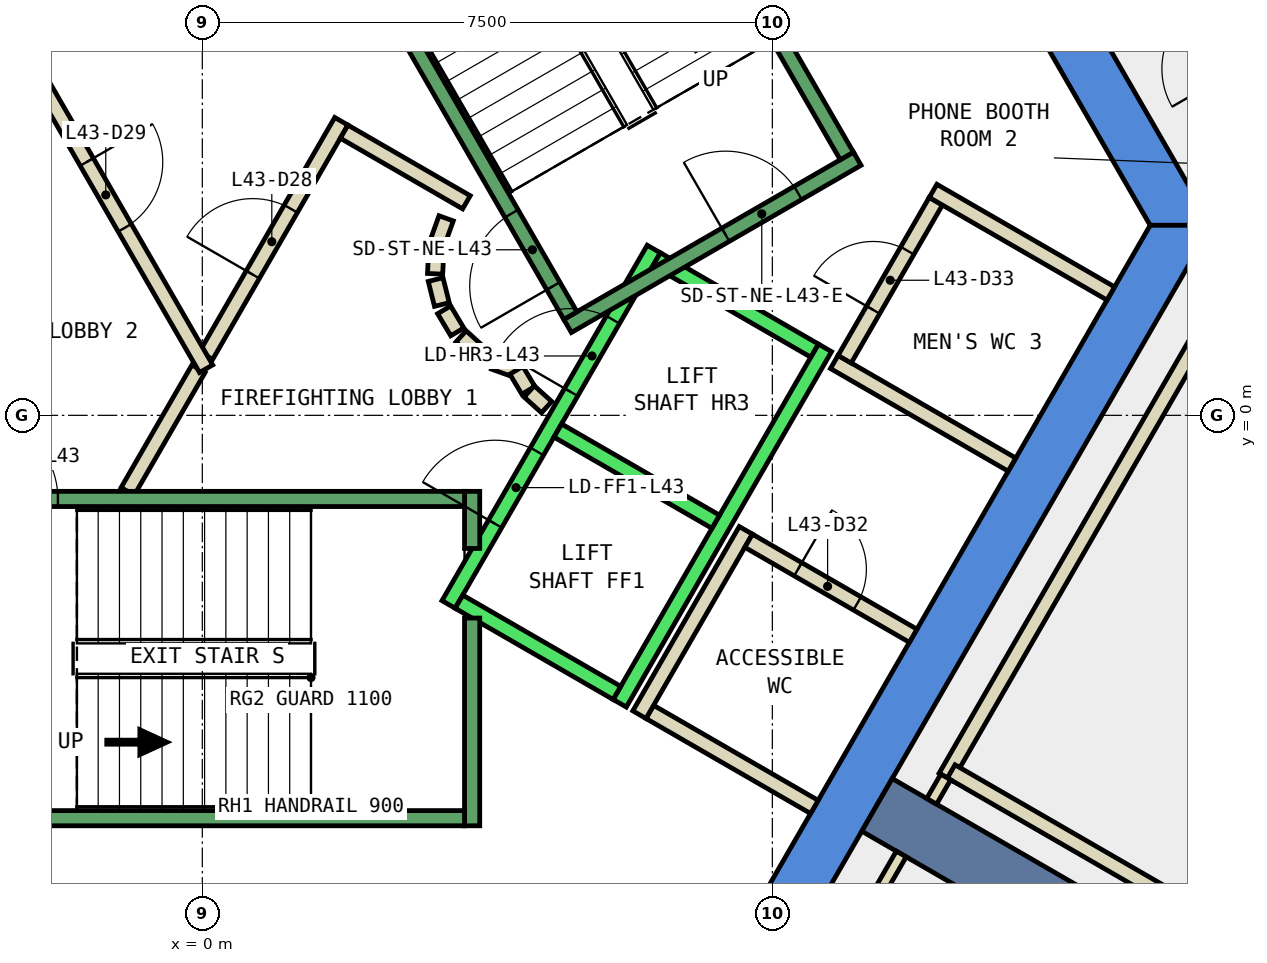
"""IFC4 building model, lengths in metres.
Left out: names, types, materials, properties, quantities, classifications, styles, units other than length and angle.
Written with IfcOpenShell. Run it as: python <this file> out.ifc"""

import sys

from ifc_helpers import new_model, si_unit, direction, frame, frame_2d, origin, place, context, subcontext, project, spatial, polyline, rectangle, outline, extrude, element, fill, save


model = new_model("IFC4")
c1 = context("Model", 3, precision=1e-05, world=origin(), true_north=direction((0.0, 1.0)))
c2 = subcontext(c1, "Body", "Model", "MODEL_VIEW")
j1 = project(units=[si_unit("LENGTHUNIT", "METRE"), si_unit("PLANEANGLEUNIT", "RADIAN")], contexts=[c1])
p1 = place(None, origin())
s1 = spatial("IfcSite", under=j1, at=p1, CompositionType="ELEMENT")
p2 = place(p1, origin())
s2 = spatial("IfcBuilding", under=s1, at=p2, CompositionType="ELEMENT")
p3 = place(p2, frame((0.0, 0.0, 194.0)))
s3 = spatial("IfcBuildingStorey", under=s2, at=p3, CompositionType="ELEMENT", Elevation=194.0)
p4 = place(p3, frame((0.0, 0.0, -0.4)))
e1 = element("IfcWall", 1, at=p4, inside=s3, PredefinedType="SHEAR", context=c2, shape_type="SweptSolid", body=[
    extrude(outline(polyline([(8.084, 11.498), (7.478, 11.148), (12.471, 2.5), (13.279, 2.5), (8.084, 11.498)])), origin(), (0.0, 0.0, 1.0), 4.2),
])
p5 = place(p3, frame((0.0, 0.0, -0.4)))
e2 = element("IfcWall", 2, at=p5, inside=s3, PredefinedType="SHEAR", context=c2, shape_type="SweptSolid", body=[
    extrude(outline(polyline([(6.64, -9.0), (13.279, 2.5), (12.471, 2.5), (6.235, -8.3), (6.64, -9.0)])), origin(), (0.0, 0.0, 1.0), 4.2),
])
p6 = place(p3, frame((8.877, -5.125, -0.4), z_axis=(0.0, 0.0, 1.0), x_axis=(0.866017533419, -0.500013631625, 0.0)))
e3 = element("IfcWall", 3, at=p6, inside=s3, PredefinedType="SHEAR", context=c2, shape_type="SweptSolid", body=[
    extrude(rectangle(XDim=9.0, YDim=0.8, at=frame_2d((4.5, 0.0))), origin(), (0.0, 0.0, 1.0), 4.2),
])
p7 = place(p3, frame((14.213, 3.543, 0.0), z_axis=(0.0, 0.0, 1.0), x_axis=(-0.500182898346, 0.865919781621, 0.0)))
e4 = element("IfcWall", 4, at=p7, inside=s3, PredefinedType="PARTITIONING", context=c2, shape_type="SweptSolid", body=[
    extrude(rectangle(XDim=3.35, YDim=0.2, at=frame_2d((1.675, 0.0))), origin(), (0.0, 0.0, 1.0), 3.8),
])
p8 = place(p7, frame((1.175, 0.0, 0.0)))
e5 = element("IfcOpeningElement", 5, at=p8, cuts=e4, PredefinedType="OPENING", context=c2, shape_type="SweptSolid", body=[
    extrude(rectangle(XDim=1.0, YDim=2.1, at=frame_2d((0.5, 1.05))), frame((0.0, 0.11, 0.0), z_axis=(0.0, -1.0, 0.0), x_axis=(1.0, 0.0, 0.0)), (0.0, 0.0, 1.0), 0.22),
])
p9 = place(p3, frame((11.811, 11.503, 0.0), z_axis=(0.0, 0.0, 1.0), x_axis=(0.500013420409, -0.866017655369, 0.0)))
e6 = element("IfcWall", 6, at=p9, inside=s3, PredefinedType="PARTITIONING", context=c2, shape_type="SweptSolid", body=[
    extrude(rectangle(XDim=8.038, YDim=0.2, at=frame_2d((4.019, 0.0))), origin(), (0.0, 0.0, 1.0), 3.8),
])
p10 = place(p9, frame((3.594, 0.0, 0.0)))
e7 = element("IfcOpeningElement", 7, at=p10, cuts=e6, PredefinedType="OPENING", context=c2, shape_type="SweptSolid", body=[
    extrude(rectangle(XDim=1.0, YDim=2.1, at=frame_2d((0.5, 1.05))), frame((0.0, 0.11, 0.0), z_axis=(0.0, -1.0, 0.0), x_axis=(1.0, 0.0, 0.0)), (0.0, 0.0, 1.0), 0.22),
])
p11 = place(p3, frame((8.053, -5.152, 0.0), z_axis=(0.0, 0.0, 1.0), x_axis=(-0.866022959057, 0.500004234368, 0.0)))
e8 = element("IfcWall", 8, at=p11, inside=s3, PredefinedType="PARTITIONING", context=c2, shape_type="SweptSolid", body=[
    extrude(rectangle(XDim=2.5, YDim=0.2, at=frame_2d((1.25, 0.0))), origin(), (0.0, 0.0, 1.0), 3.8),
])
p12 = place(p3, frame((5.751, -3.938, 0.0), z_axis=(0.0, 0.0, 1.0), x_axis=(0.49994636267, 0.866056369097, 0.0)))
e9 = element("IfcWall", 9, at=p12, inside=s3, PredefinedType="PARTITIONING", context=c2, shape_type="SweptSolid", body=[
    extrude(rectangle(XDim=2.8, YDim=0.2, at=frame_2d((1.4, 0.0))), origin(), (0.0, 0.0, 1.0), 3.8),
])
p13 = place(p3, frame((7.188, -1.65, 0.0), z_axis=(0.0, 0.0, 1.0), x_axis=(0.866022959057, -0.500004234368, 0.0)))
e10 = element("IfcWall", 10, at=p13, inside=s3, PredefinedType="PARTITIONING", context=c2, shape_type="SweptSolid", body=[
    extrude(rectangle(XDim=2.5, YDim=0.2, at=frame_2d((1.25, 0.0))), origin(), (0.0, 0.0, 1.0), 3.8),
])
p14 = place(p13, frame((0.75, 0.0, 0.0)))
e11 = element("IfcOpeningElement", 11, at=p14, cuts=e10, PredefinedType="OPENING", context=c2, shape_type="SweptSolid", body=[
    extrude(rectangle(XDim=0.9, YDim=2.1, at=frame_2d((0.45, 1.05))), frame((0.0, 0.11, 0.0), z_axis=(0.0, -1.0, 0.0), x_axis=(1.0, 0.0, 0.0)), (0.0, 0.0, 1.0), 0.22),
])
p15 = place(p3, frame((10.653, -0.648, 0.0), z_axis=(0.0, 0.0, 1.0), x_axis=(-0.866036505625, 0.499980770555, 0.0)))
e12 = element("IfcWall", 12, at=p15, inside=s3, PredefinedType="PARTITIONING", context=c2, shape_type="SweptSolid", body=[
    extrude(rectangle(XDim=2.7, YDim=0.2, at=frame_2d((1.35, 0.0))), origin(), (0.0, 0.0, 1.0), 3.8),
])
p16 = place(p3, frame((8.451, 0.738, 0.0), z_axis=(0.0, 0.0, 1.0), x_axis=(0.499913221443, 0.866075499611, 0.0)))
e13 = element("IfcWall", 13, at=p16, inside=s3, PredefinedType="PARTITIONING", context=c2, shape_type="SweptSolid", body=[
    extrude(rectangle(XDim=2.4, YDim=0.2, at=frame_2d((1.2, 0.0))), origin(), (0.0, 0.0, 1.0), 3.8),
])
p17 = place(p16, frame((0.75, 0.0, 0.0)))
e14 = element("IfcOpeningElement", 14, at=p17, cuts=e13, PredefinedType="OPENING", context=c2, shape_type="SweptSolid", body=[
    extrude(rectangle(XDim=0.9, YDim=2.1, at=frame_2d((0.45, 1.05))), frame((0.0, 0.11, 0.0), z_axis=(0.0, -1.0, 0.0), x_axis=(1.0, 0.0, 0.0)), (0.0, 0.0, 1.0), 0.22),
])
p18 = place(p3, frame((9.615, 2.953, 0.0), z_axis=(0.0, 0.0, 1.0), x_axis=(0.866013897511, -0.50001992892, 0.0)))
e15 = element("IfcWall", 15, at=p18, inside=s3, PredefinedType="PARTITIONING", context=c2, shape_type="SweptSolid", body=[
    extrude(rectangle(XDim=2.7, YDim=0.2, at=frame_2d((1.35, 0.0))), origin(), (0.0, 0.0, 1.0), 3.8),
])
p19 = place(p3, frame((7.283, -9.086, 0.0), z_axis=(0.0, 0.0, 1.0), x_axis=(0.499843936326, 0.866115488442, 0.0)))
e16 = element("IfcWall", 16, at=p19, inside=s3, PredefinedType="PARTITIONING", context=c2, shape_type="SweptSolid", body=[
    extrude(rectangle(XDim=3.827, YDim=0.15, at=frame_2d((1.914, 0.0))), origin(), (0.0, 0.0, 1.0), 3.8),
])
p20 = place(p3, frame((9.781, -4.758, 0.0), z_axis=(0.0, 0.0, 1.0), x_axis=(0.50003174578, 0.866007074574, 0.0)))
e17 = element("IfcWall", 17, at=p20, inside=s3, PredefinedType="PARTITIONING", context=c2, shape_type="SweptSolid", body=[
    extrude(rectangle(XDim=9.315, YDim=0.2, at=frame_2d((4.658, 0.0))), origin(), (0.0, 0.0, 1.0), 3.8),
])
p21 = place(p3, frame((-0.982, -1.0, 0.0), z_axis=(0.0, 0.0, 1.0), x_axis=(0.50024047865, 0.865886518847, 0.0)))
e18 = element("IfcWall", 18, at=p21, inside=s3, PredefinedType="PARTITIONING", context=c2, shape_type="SweptSolid", body=[
    extrude(rectangle(XDim=1.863, YDim=0.2, at=frame_2d((0.931, 0.0))), origin(), (0.0, 0.0, 1.0), 3.8),
])
p22 = place(p3, frame((0.05, 0.787, 0.0), z_axis=(0.0, 0.0, 1.0), x_axis=(0.499954076797, 0.866051915934, 0.0)))
e19 = element("IfcWall", 19, at=p22, inside=s3, PredefinedType="PARTITIONING", context=c2, shape_type="SweptSolid", body=[
    extrude(rectangle(XDim=3.558, YDim=0.2, at=frame_2d((1.779, 0.0))), origin(), (0.0, 0.0, 1.0), 3.8),
])
p23 = place(p22, frame((1.229, 0.0, 0.0)))
e20 = element("IfcOpeningElement", 20, at=p23, cuts=e19, PredefinedType="OPENING", context=c2, shape_type="SweptSolid", body=[
    extrude(rectangle(XDim=1.0, YDim=2.1, at=frame_2d((0.5, 1.05))), frame((0.0, 0.11, 0.0), z_axis=(0.0, -1.0, 0.0), x_axis=(1.0, 0.0, 0.0)), (0.0, 0.0, 1.0), 0.22),
])
p24 = place(p3, frame((1.866, 3.732, 0.0), z_axis=(0.0, 0.0, 1.0), x_axis=(0.866043361281, -0.499968895414, 0.0)))
e21 = element("IfcWall", 21, at=p24, inside=s3, PredefinedType="PARTITIONING", context=c2, shape_type="SweptSolid", body=[
    extrude(rectangle(XDim=1.858, YDim=0.2, at=frame_2d((0.929, 0.0))), origin(), (0.0, 0.0, 1.0), 3.8),
])
p25 = place(p3, frame((3.208, 2.592, 0.0), z_axis=(0.0, 0.0, 1.0), x_axis=(-0.337388820924, -0.941365382578, 0.0)))
e22 = element("IfcWall", 22, at=p25, inside=s3, PredefinedType="PARTITIONING", context=c2, shape_type="SweptSolid", body=[
    extrude(rectangle(XDim=0.338, YDim=0.2, at=frame_2d((0.169, 0.0))), origin(), (0.0, 0.0, 1.0), 3.8),
])
p26 = place(p3, frame((3.079, 2.199, 0.0), z_axis=(0.0, 0.0, 1.0), x_axis=(-0.047771483479, -0.998858290933, 0.0)))
e23 = element("IfcWall", 23, at=p26, inside=s3, PredefinedType="PARTITIONING", context=c2, shape_type="SweptSolid", body=[
    extrude(rectangle(XDim=0.337, YDim=0.2, at=frame_2d((0.169, 0.0))), origin(), (0.0, 0.0, 1.0), 3.8),
])
p27 = place(p3, frame((3.07, 1.786, 0.0), z_axis=(0.0, 0.0, 1.0), x_axis=(0.242705583207, -0.970099994784, 0.0)))
e24 = element("IfcWall", 24, at=p27, inside=s3, PredefinedType="PARTITIONING", context=c2, shape_type="SweptSolid", body=[
    extrude(rectangle(XDim=0.338, YDim=0.2, at=frame_2d((0.169, 0.0))), origin(), (0.0, 0.0, 1.0), 3.8),
])
for number, where, z_axis, x_axis in (
    (25, (3.182, 1.388, 0.0), (0.0, 0.0, 1.0), (0.512, -0.859, 0.0)),
    (26, (3.404, 1.039, 0.0), (0.0, 0.0, 1.0), (0.74, -0.672, 0.0)),
):
    element("IfcWall", number, at=place(p3, frame(where, z_axis=z_axis, x_axis=x_axis)), inside=s3, PredefinedType="PARTITIONING", context=c2, shape_type="SweptSolid", body=[
        extrude(rectangle(XDim=0.338, YDim=0.2, at=frame_2d((0.169, 0.0))), origin(), (0.0, 0.0, 1.0), 3.8),
    ])
p28 = place(p3, frame((3.838, 0.702, 0.0), z_axis=(0.0, 0.0, 1.0), x_axis=(0.941035081519, -0.338308993895, 0.0)))
e27 = element("IfcWall", 27, at=p28, inside=s3, PredefinedType="PARTITIONING", context=c2, shape_type="SweptSolid", body=[
    extrude(rectangle(XDim=0.337, YDim=0.2, at=frame_2d((0.168, 0.0))), origin(), (0.0, 0.0, 1.0), 3.8),
])
p29 = place(p3, frame((4.132, 0.593, 0.0), z_axis=(0.0, 0.0, 1.0), x_axis=(0.513561617048, -0.858052717201, 0.0)))
e28 = element("IfcWall", 28, at=p29, inside=s3, PredefinedType="PARTITIONING", context=c2, shape_type="SweptSolid", body=[
    extrude(rectangle(XDim=0.308, YDim=0.2, at=frame_2d((0.154, 0.0))), origin(), (0.0, 0.0, 1.0), 3.8),
])
p30 = place(p3, frame((4.301, 0.315, 0.0), z_axis=(0.0, 0.0, 1.0), x_axis=(0.741798017506, -0.670623367639, 0.0)))
e29 = element("IfcWall", 29, at=p30, inside=s3, PredefinedType="PARTITIONING", context=c2, shape_type="SweptSolid", body=[
    extrude(rectangle(XDim=0.309, YDim=0.2, at=frame_2d((0.154, 0.0))), origin(), (0.0, 0.0, 1.0), 3.8),
])
p31 = place(p3, frame((-2.54, 5.1, 0.0), z_axis=(0.0, 0.0, 1.0), x_axis=(0.499925051871, -0.866068670783, 0.0)))
e30 = element("IfcWall", 30, at=p31, inside=s3, PredefinedType="PARTITIONING", context=c2, shape_type="SweptSolid", body=[
    extrude(rectangle(XDim=5.181, YDim=0.2, at=frame_2d((2.59, 0.0))), origin(), (0.0, 0.0, 1.0), 3.8),
])
p32 = place(p31, frame((2.04, 0.0, 0.0)))
e31 = element("IfcOpeningElement", 31, at=p32, cuts=e30, PredefinedType="OPENING", context=c2, shape_type="SweptSolid", body=[
    extrude(rectangle(XDim=1.0, YDim=2.1, at=frame_2d((0.5, 1.05))), frame((0.0, 0.11, 0.0), z_axis=(0.0, -1.0, 0.0), x_axis=(1.0, 0.0, 0.0)), (0.0, 0.0, 1.0), 0.22),
])
p33 = place(p3, frame((9.853, -4.684, 0.0), z_axis=(0.0, 0.0, 1.0), x_axis=(0.865999791918, -0.500044358431, 0.0)))
e32 = element("IfcWall", 32, at=p33, inside=s3, PredefinedType="PARTITIONING", context=c2, shape_type="SweptSolid", body=[
    extrude(rectangle(XDim=8.075, YDim=0.2, at=frame_2d((4.038, 0.0))), origin(), (0.0, 0.0, 1.0), 3.8),
])
p34 = place(p3, frame((9.596, -5.078, 0.0), z_axis=(0.0, 0.0, 1.0), x_axis=(0.500827895298, 0.86554689029, 0.0)))
e33 = element("IfcWall", 33, at=p34, inside=s3, PredefinedType="PARTITIONING", context=c2, shape_type="SweptSolid", body=[
    extrude(rectangle(XDim=0.369, YDim=0.15, at=frame_2d((0.185, 0.0))), origin(), (0.0, 0.0, 1.0), 3.8),
])
p35 = place(p3, frame((3.24, -2.488, 0.0), z_axis=(0.0, 0.0, 1.0), x_axis=(0.500034260056, 0.866005622828, 0.0)))
e34 = element("IfcWall", 34, at=p35, inside=s3, PredefinedType="STANDARD", context=c2, shape_type="SweptSolid", body=[
    extrude(rectangle(XDim=5.399, YDim=0.2, at=frame_2d((2.7, 0.0))), origin(), (0.0, 0.0, 1.0), 3.8),
])
p36 = place(p35, frame((3.225, 0.0, 0.0)))
e35 = element("IfcOpeningElement", 35, at=p36, cuts=e34, PredefinedType="OPENING", context=c2, shape_type="SweptSolid", body=[
    extrude(rectangle(XDim=1.1, YDim=2.1, at=frame_2d((0.55, 1.05))), frame((0.0, 0.11, 0.0), z_axis=(0.0, -1.0, 0.0), x_axis=(1.0, 0.0, 0.0)), (0.0, 0.0, 1.0), 0.22),
])
p37 = place(p35, frame((1.225, 0.0, 0.0)))
e36 = element("IfcOpeningElement", 36, at=p37, cuts=e34, PredefinedType="OPENING", context=c2, shape_type="SweptSolid", body=[
    extrude(rectangle(XDim=1.1, YDim=2.1, at=frame_2d((0.55, 1.05))), frame((0.0, 0.11, 0.0), z_axis=(0.0, -1.0, 0.0), x_axis=(1.0, 0.0, 0.0)), (0.0, 0.0, 1.0), 0.22),
])
p38 = place(p3, frame((5.492, -3.788, 0.0), z_axis=(0.0, 0.0, 1.0), x_axis=(0.500034260056, 0.866005622828, 0.0)))
e37 = element("IfcWall", 37, at=p38, inside=s3, PredefinedType="STANDARD", context=c2, shape_type="SweptSolid", body=[
    extrude(rectangle(XDim=5.399, YDim=0.2, at=frame_2d((2.7, 0.0))), origin(), (0.0, 0.0, 1.0), 3.8),
])
p39 = place(p3, frame((3.377, -2.452, 0.0), z_axis=(0.0, 0.0, 1.0), x_axis=(0.865955154139, -0.50012165622, 0.0)))
e38 = element("IfcWall", 38, at=p39, inside=s3, PredefinedType="STANDARD", context=c2, shape_type="SweptSolid", body=[
    extrude(rectangle(XDim=2.4, YDim=0.2, at=frame_2d((1.2, 0.0))), origin(), (0.0, 0.0, 1.0), 3.8),
])
for number, where, z_axis, x_axis in (
    (39, (4.677, -0.2, 0.0), (0.0, 0.0, 1.0), (0.866, -0.5, 0.0)),
    (40, (5.977, 2.052, 0.0), (0.0, 0.0, 1.0), (0.866, -0.5, 0.0)),
):
    element("IfcWall", number, at=place(p3, frame(where, z_axis=z_axis, x_axis=x_axis)), inside=s3, PredefinedType="STANDARD", context=c2, shape_type="SweptSolid", body=[
        extrude(rectangle(XDim=2.399, YDim=0.2, at=frame_2d((1.2, 0.0))), origin(), (0.0, 0.0, 1.0), 3.8),
    ])
p40 = place(p3, frame((3.55, -2.667, 0.0), z_axis=(0.0, 0.0, 1.0), x_axis=(0.0, -1.0, 0.0)))
e41 = element("IfcWall", 41, at=p40, inside=s3, PredefinedType="STANDARD", context=c2, shape_type="SweptSolid", body=[
    extrude(rectangle(XDim=2.733, YDim=0.2, at=frame_2d((1.366, 0.0))), origin(), (0.0, 0.0, 1.0), 3.8),
])
p41 = place(p3, frame((3.55, -1.0, 0.0), z_axis=(0.0, 0.0, 1.0), x_axis=(0.0, -1.0, 0.0)))
e42 = element("IfcWall", 42, at=p41, inside=s3, PredefinedType="STANDARD", context=c2, shape_type="SweptSolid", body=[
    extrude(rectangle(XDim=0.751, YDim=0.2, at=frame_2d((0.375, 0.0))), origin(), (0.0, 0.0, 1.0), 3.8),
])
p42 = place(p3, frame((-3.45, -1.1, 0.0), z_axis=(0.0, 0.0, 1.0), x_axis=(1.0, 0.0, 0.0)))
e43 = element("IfcWall", 43, at=p42, inside=s3, PredefinedType="STANDARD", context=c2, shape_type="SweptSolid", body=[
    extrude(rectangle(XDim=6.9, YDim=0.2, at=frame_2d((3.45, 0.0))), origin(), (0.0, 0.0, 1.0), 3.8),
])
p43 = place(p42, frame((0.45, 0.0, 0.0)))
e44 = element("IfcOpeningElement", 44, at=p43, cuts=e43, PredefinedType="OPENING", context=c2, shape_type="SweptSolid", body=[
    extrude(rectangle(XDim=1.1, YDim=2.2, at=frame_2d((0.55, 1.1))), frame((0.0, 0.11, 0.0), z_axis=(0.0, -1.0, 0.0), x_axis=(1.0, 0.0, 0.0)), (0.0, 0.0, 1.0), 0.22),
])
p44 = place(p3, frame((-3.45, -5.3, 0.0), z_axis=(0.0, 0.0, 1.0), x_axis=(1.0, 0.0, 0.0)))
e45 = element("IfcWall", 45, at=p44, inside=s3, PredefinedType="STANDARD", context=c2, shape_type="SweptSolid", body=[
    extrude(rectangle(XDim=6.9, YDim=0.2, at=frame_2d((3.45, 0.0))), origin(), (0.0, 0.0, 1.0), 3.8),
])
p45 = place(p3, frame((4.806, 1.176, 0.0), z_axis=(0.0, 0.0, 1.0), x_axis=(0.866059941101, 0.499940174841, 0.0)))
e46 = element("IfcWall", 46, at=p45, inside=s3, PredefinedType="STANDARD", context=c2, shape_type="SweptSolid", body=[
    extrude(rectangle(XDim=4.4, YDim=0.2, at=frame_2d((2.2, 0.0))), origin(), (0.0, 0.0, 1.0), 3.8),
])
p46 = place(p45, frame((2.4, 0.0, 0.0)))
e47 = element("IfcOpeningElement", 47, at=p46, cuts=e46, PredefinedType="OPENING", context=c2, shape_type="SweptSolid", body=[
    extrude(rectangle(XDim=1.1, YDim=2.2, at=frame_2d((0.55, 1.1))), frame((0.0, 0.11, 0.0), z_axis=(0.0, -1.0, 0.0), x_axis=(1.0, 0.0, 0.0)), (0.0, 0.0, 1.0), 0.22),
])
p47 = place(p3, frame((4.843, 1.312, 0.0), z_axis=(0.0, 0.0, 1.0), x_axis=(-0.499963383562, 0.866046543262, 0.0)))
e48 = element("IfcWall", 48, at=p47, inside=s3, PredefinedType="STANDARD", context=c2, shape_type="SweptSolid", body=[
    extrude(rectangle(XDim=6.9, YDim=0.2, at=frame_2d((3.45, 0.0))), origin(), (0.0, 0.0, 1.0), 3.8),
])
p48 = place(p47, frame((0.45, 0.0, 0.0)))
e49 = element("IfcOpeningElement", 49, at=p48, cuts=e48, PredefinedType="OPENING", context=c2, shape_type="SweptSolid", body=[
    extrude(rectangle(XDim=1.1, YDim=2.2, at=frame_2d((0.55, 1.1))), frame((0.0, 0.11, 0.0), z_axis=(0.0, -1.0, 0.0), x_axis=(1.0, 0.0, 0.0)), (0.0, 0.0, 1.0), 0.22),
])
p49 = place(p3, frame((8.48, 3.412, 0.0), z_axis=(0.0, 0.0, 1.0), x_axis=(-0.499978703459, 0.866037698999, 0.0)))
e50 = element("IfcWall", 50, at=p49, inside=s3, PredefinedType="STANDARD", context=c2, shape_type="SweptSolid", body=[
    extrude(rectangle(XDim=6.9, YDim=0.2, at=frame_2d((3.45, 0.0))), origin(), (0.0, 0.0, 1.0), 3.8),
])
p50 = place(p3, frame((-1.393, 7.288, 0.0), z_axis=(0.0, 0.0, 1.0), x_axis=(-0.499963383562, -0.866046543262, 0.0)))
e51 = element("IfcWall", 51, at=p50, inside=s3, PredefinedType="STANDARD", context=c2, shape_type="SweptSolid", body=[
    extrude(rectangle(XDim=6.9, YDim=0.2, at=frame_2d((3.45, 0.0))), origin(), (0.0, 0.0, 1.0), 3.8),
])
p51 = place(p50, frame((0.45, 0.0, 0.0)))
e52 = element("IfcOpeningElement", 52, at=p51, cuts=e51, PredefinedType="OPENING", context=c2, shape_type="SweptSolid", body=[
    extrude(rectangle(XDim=1.1, YDim=2.2, at=frame_2d((0.55, 1.1))), frame((0.0, 0.11, 0.0), z_axis=(0.0, -1.0, 0.0), x_axis=(1.0, 0.0, 0.0)), (0.0, 0.0, 1.0), 0.22),
])
p52 = place(p23, origin())
e53 = element("IfcDoor", 53, at=p52, inside=s3, OperationType="SINGLE_SWING_RIGHT", PredefinedType="DOOR", context=c2, shape_type="SweptSolid", body=[
    extrude(rectangle(XDim=1.0, YDim=2.1, at=frame_2d((0.5, 1.05))), frame((0.0, 0.025, 0.0), z_axis=(0.0, -1.0, 0.0), x_axis=(1.0, 0.0, 0.0)), (0.0, 0.0, 1.0), 0.05),
])
fill(e20, e53)
p53 = place(p32, origin())
e54 = element("IfcDoor", 54, at=p53, inside=s3, OperationType="SINGLE_SWING_RIGHT", PredefinedType="DOOR", context=c2, shape_type="SweptSolid", body=[
    extrude(rectangle(XDim=1.0, YDim=2.1, at=frame_2d((0.5, 1.05))), frame((0.0, 0.025, 0.0), z_axis=(0.0, -1.0, 0.0), x_axis=(1.0, 0.0, 0.0)), (0.0, 0.0, 1.0), 0.05),
])
fill(e31, e54)
p54 = place(p14, origin())
e55 = element("IfcDoor", 55, at=p54, inside=s3, OperationType="SINGLE_SWING_RIGHT", PredefinedType="DOOR", context=c2, shape_type="SweptSolid", body=[
    extrude(rectangle(XDim=0.9, YDim=2.1, at=frame_2d((0.45, 1.05))), frame((0.0, 0.025, 0.0), z_axis=(0.0, -1.0, 0.0), x_axis=(1.0, 0.0, 0.0)), (0.0, 0.0, 1.0), 0.05),
])
fill(e11, e55)
p55 = place(p17, origin())
e56 = element("IfcDoor", 56, at=p55, inside=s3, OperationType="SINGLE_SWING_LEFT", PredefinedType="DOOR", context=c2, shape_type="SweptSolid", body=[
    extrude(rectangle(XDim=0.9, YDim=2.1, at=frame_2d((0.45, 1.05))), frame((0.0, 0.025, 0.0), z_axis=(0.0, -1.0, 0.0), x_axis=(1.0, 0.0, 0.0)), (0.0, 0.0, 1.0), 0.05),
])
fill(e14, e56)
p56 = place(p36, origin())
e57 = element("IfcDoor", 57, at=p56, inside=s3, OperationType="SLIDING_TO_LEFT", PredefinedType="DOOR", context=c2, shape_type="SweptSolid", body=[
    extrude(rectangle(XDim=1.1, YDim=2.1, at=frame_2d((0.55, 1.05))), frame((0.0, 0.025, 0.0), z_axis=(0.0, -1.0, 0.0), x_axis=(1.0, 0.0, 0.0)), (0.0, 0.0, 1.0), 0.05),
])
fill(e35, e57)
p57 = place(p37, origin())
e58 = element("IfcDoor", 58, at=p57, inside=s3, OperationType="SLIDING_TO_LEFT", PredefinedType="DOOR", context=c2, shape_type="SweptSolid", body=[
    extrude(rectangle(XDim=1.1, YDim=2.1, at=frame_2d((0.55, 1.05))), frame((0.0, 0.025, 0.0), z_axis=(0.0, -1.0, 0.0), x_axis=(1.0, 0.0, 0.0)), (0.0, 0.0, 1.0), 0.05),
])
fill(e36, e58)
p58 = place(p43, origin())
e59 = element("IfcDoor", 59, at=p58, inside=s3, OperationType="SINGLE_SWING_LEFT", PredefinedType="DOOR", context=c2, shape_type="SweptSolid", body=[
    extrude(rectangle(XDim=1.1, YDim=2.2, at=frame_2d((0.55, 1.1))), frame((0.0, 0.025, 0.0), z_axis=(0.0, -1.0, 0.0), x_axis=(1.0, 0.0, 0.0)), (0.0, 0.0, 1.0), 0.05),
])
fill(e44, e59)
p59 = place(p48, origin())
e60 = element("IfcDoor", 60, at=p59, inside=s3, OperationType="SINGLE_SWING_LEFT", PredefinedType="DOOR", context=c2, shape_type="SweptSolid", body=[
    extrude(rectangle(XDim=1.1, YDim=2.2, at=frame_2d((0.55, 1.1))), frame((0.0, 0.025, 0.0), z_axis=(0.0, -1.0, 0.0), x_axis=(1.0, 0.0, 0.0)), (0.0, 0.0, 1.0), 0.05),
])
fill(e49, e60)
p60 = place(p46, origin())
e61 = element("IfcDoor", 61, at=p60, inside=s3, OperationType="SINGLE_SWING_LEFT", PredefinedType="DOOR", context=c2, shape_type="SweptSolid", body=[
    extrude(rectangle(XDim=1.1, YDim=2.2, at=frame_2d((0.55, 1.1))), frame((0.0, 0.025, 0.0), z_axis=(0.0, -1.0, 0.0), x_axis=(1.0, 0.0, 0.0)), (0.0, 0.0, 1.0), 0.05),
])
fill(e47, e61)
save(model, sys.argv[1])
